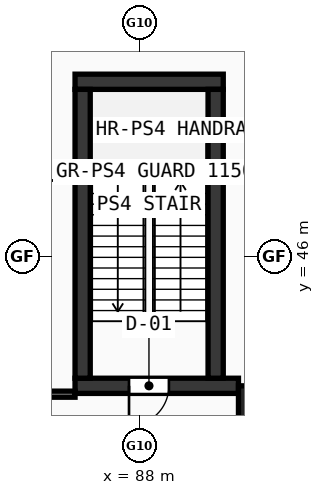
"""IFC4 building model, lengths in metres.
Left out: names, types, materials, properties, quantities, classifications, styles, units other than length and angle.
Written with IfcOpenShell. Run it as: python <this file> out.ifc"""

import sys

from ifc_helpers import new_model, si_unit, direction, frame, frame_2d, origin, origin_2d, place, context, subcontext, project, spatial, rectangle, hollow_rectangle, extrude, source, transform, mapped, element, fill, save


model = new_model("IFC4")
c1 = context("Model", 3, precision=1e-05, world=origin(), true_north=direction((0.0, 1.0)))
c2 = subcontext(c1, "Body", "Model", "MODEL_VIEW")
j1 = project(units=[si_unit("LENGTHUNIT", "METRE"), si_unit("PLANEANGLEUNIT", "RADIAN")], contexts=[c1])
p1 = place(None, origin())
s1 = spatial("IfcSite", under=j1, at=p1, CompositionType="ELEMENT")
p2 = place(p1, origin())
s2 = spatial("IfcBuilding", under=s1, at=p2, CompositionType="ELEMENT")
p3 = place(p2, frame((0.0, 0.0, -10.0)))
s3 = spatial("IfcBuildingStorey", under=s2, at=p3, CompositionType="ELEMENT", Elevation=-10.0)
p4 = place(p3, frame((86.3, 50.6, -0.6), z_axis=(0.0, 0.0, 1.0), x_axis=(1.0, 0.0, 0.0)))
e1 = element("IfcWall", 1, at=p4, inside=s3, PredefinedType="SHEAR", context=c2, shape_type="SweptSolid", body=[
    extrude(rectangle(XDim=3.9, YDim=0.4, at=frame_2d((1.95, 0.0))), origin(), (0.0, 0.0, 1.0), 5.5),
])
p5 = place(p3, frame((86.3, 42.6, -0.6), z_axis=(0.0, 0.0, 1.0), x_axis=(1.0, 0.0, 0.0)))
e2 = element("IfcWall", 2, at=p5, inside=s3, PredefinedType="SHEAR", context=c2, shape_type="SweptSolid", body=[
    extrude(rectangle(XDim=4.3, YDim=0.4, at=frame_2d((2.15, 0.0))), origin(), (0.0, 0.0, 1.0), 5.5),
])
p6 = place(p5, frame((1.42, 0.0, 0.6)))
e3 = element("IfcOpeningElement", 3, at=p6, cuts=e2, PredefinedType="OPENING", context=c2, shape_type="SweptSolid", body=[
    extrude(rectangle(XDim=1.05, YDim=2.1, at=frame_2d((0.525, 1.05))), frame((0.0, 0.21, 0.0), z_axis=(0.0, -1.0, 0.0), x_axis=(1.0, 0.0, 0.0)), (0.0, 0.0, 1.0), 0.42),
])
for number, where, z_axis, x_axis in (
    (4, (86.5, 42.8, -0.6), (0.0, 0.0, 1.0), (0.0, 1.0, 0.0)),
    (5, (90.0, 42.8, -0.6), (0.0, 0.0, 1.0), (0.0, 1.0, 0.0)),
):
    element("IfcWall", number, at=place(p3, frame(where, z_axis=z_axis, x_axis=x_axis)), inside=s3, PredefinedType="SHEAR", context=c2, shape_type="SweptSolid", body=[
        extrude(rectangle(XDim=7.6, YDim=0.4, at=frame_2d((3.8, 0.0))), origin(), (0.0, 0.0, 1.0), 5.5),
    ])
m1 = source(origin(), c2, "Body", "SweptSolid", [
    extrude(hollow_rectangle(XDim=1.2, YDim=1.2, WallThickness=0.05, at=origin_2d()), origin(), (0.0, 0.0, 1.0), 5.5),
])
p7 = place(p3, frame((91.2, 42.0, -0.6), z_axis=(0.0, 0.0, 1.0), x_axis=(1.0, 0.0, 0.0)))
e6 = element("IfcColumn", 6, at=p7, inside=s3, PredefinedType="COLUMN", context=c2, shape_type="MappedRepresentation", body=[
    mapped(m1, transform((0.0, 0.0, 0.0), scale=1.0)),
])
p8 = place(p3, frame((45.92, 42.38, 0.0), z_axis=(0.0, 0.0, 1.0), x_axis=(1.0, 0.0, 0.0)))
e7 = element("IfcWall", 7, at=p8, inside=s3, PredefinedType="PARTITIONING", context=c2, shape_type="SweptSolid", body=[
    extrude(rectangle(XDim=40.38, YDim=0.16, at=frame_2d((20.19, 0.0))), origin(), (0.0, 0.0, 1.0), 4.0),
])
p9 = place(p8, frame((10.0, 0.0, 0.0)))
e8 = element("IfcOpeningElement", 8, at=p9, cuts=e7, PredefinedType="OPENING", context=c2, shape_type="SweptSolid", body=[
    extrude(rectangle(XDim=0.9, YDim=2.1, at=frame_2d((0.45, 1.05))), frame((0.0, 0.09, 0.0), z_axis=(0.0, -1.0, 0.0), x_axis=(1.0, 0.0, 0.0)), (0.0, 0.0, 1.0), 0.18),
])
m2 = source(origin(), c2, "Body", "SweptSolid", [
    extrude(rectangle(XDim=1.05, YDim=2.1, at=frame_2d((0.525, 1.05))), frame((0.0, 0.025, 0.0), z_axis=(0.0, -1.0, 0.0), x_axis=(1.0, 0.0, 0.0)), (0.0, 0.0, 1.0), 0.05),
])
p10 = place(p6, frame((1.05, 0.0, 0.0), z_axis=(0.0, 0.0, 1.0), x_axis=(-1.0, 0.0, 0.0)))
e9 = element("IfcDoor", 9, at=p10, inside=s3, OperationType="SINGLE_SWING_RIGHT", PredefinedType="DOOR", context=c2, shape_type="MappedRepresentation", body=[
    mapped(m2, transform((0.0, 0.0, 0.0), scale=1.0)),
])
fill(e3, e9)
save(model, sys.argv[1])
